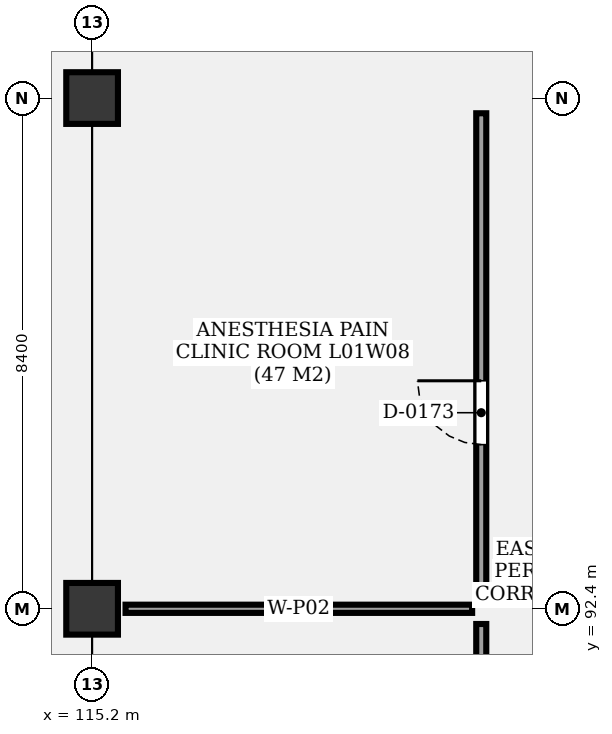
"""IFC4 building model, lengths in metres.
Left out: names, types, materials, properties, quantities, classifications, styles, units other than length and angle.
Written with IfcOpenShell. Run it as: python <this file> out.ifc"""

import sys

from ifc_helpers import new_model, si_unit, direction, frame, frame_2d, origin, origin_2d, place, context, subcontext, project, spatial, rectangle, extrude, element, fill, save


model = new_model("IFC4")
c1 = context("Model", 3, precision=1e-05, world=origin(), true_north=direction((0.0, 1.0)))
c2 = subcontext(c1, "Body", "Model", "MODEL_VIEW")
j1 = project(units=[si_unit("LENGTHUNIT", "METRE"), si_unit("PLANEANGLEUNIT", "RADIAN")], contexts=[c1])
p1 = place(None, origin())
s1 = spatial("IfcSite", under=j1, at=p1, CompositionType="ELEMENT")
p2 = place(p1, origin())
s2 = spatial("IfcBuilding", under=s1, at=p2, CompositionType="ELEMENT")
p3 = place(p2, frame((0.0, 0.0, 5.1)))
s3 = spatial("IfcBuildingStorey", under=s2, at=p3, CompositionType="ELEMENT", Elevation=5.1)
for number, where, z_axis, x_axis in (
    (1, (115.2, 92.4, 0.0), (0.0, 0.0, 1.0), (1.0, 0.0, 0.0)),
    (2, (115.2, 100.8, 0.0), (0.0, 0.0, 1.0), (1.0, 0.0, 0.0)),
):
    element("IfcColumn", number, at=place(p3, frame(where, z_axis=z_axis, x_axis=x_axis)), inside=s3, PredefinedType="COLUMN", context=c2, shape_type="SweptSolid", body=[
        extrude(rectangle(XDim=0.85, YDim=0.85, at=origin_2d()), origin(), (0.0, 0.0, 1.0), 4.8),
    ])
p4 = place(p3, frame((121.6, 84.25, 0.0), z_axis=(0.0, 0.0, 1.0), x_axis=(0.0, 1.0, 0.0)))
e3 = element("IfcWall", 3, at=p4, inside=s3, PredefinedType="PARTITIONING", context=c2, shape_type="SweptSolid", body=[
    extrude(rectangle(XDim=7.9, YDim=0.165, at=frame_2d((3.95, 0.0))), origin(), (0.0, 0.0, 1.0), 3.68),
])
p5 = place(p4, frame((2.45, 0.0, 0.0)))
e4 = element("IfcOpeningElement", 4, at=p5, cuts=e3, PredefinedType="OPENING", context=c2, shape_type="SweptSolid", body=[
    extrude(rectangle(XDim=1.15, YDim=2.2, at=frame_2d((0.575, 1.1))), frame((0.0, 0.093, 0.0), z_axis=(0.0, -1.0, 0.0), x_axis=(1.0, 0.0, 0.0)), (0.0, 0.0, 1.0), 0.185),
])
p6 = place(p3, frame((121.6, 92.65, 0.0), z_axis=(0.0, 0.0, 1.0), x_axis=(0.0, 1.0, 0.0)))
e5 = element("IfcWall", 5, at=p6, inside=s3, PredefinedType="PARTITIONING", context=c2, shape_type="SweptSolid", body=[
    extrude(rectangle(XDim=7.9, YDim=0.165, at=frame_2d((3.95, 0.0))), origin(), (0.0, 0.0, 1.0), 3.68),
])
p7 = place(p6, frame((2.45, 0.0, 0.0)))
e6 = element("IfcOpeningElement", 6, at=p7, cuts=e5, PredefinedType="OPENING", context=c2, shape_type="SweptSolid", body=[
    extrude(rectangle(XDim=1.05, YDim=2.1, at=frame_2d((0.525, 1.05))), frame((0.0, 0.093, 0.0), z_axis=(0.0, -1.0, 0.0), x_axis=(1.0, 0.0, 0.0)), (0.0, 0.0, 1.0), 0.185),
])
p8 = place(p3, frame((115.75, 92.4, 0.0), z_axis=(0.0, 0.0, 1.0), x_axis=(1.0, 0.0, 0.0)))
e7 = element("IfcWall", 7, at=p8, inside=s3, PredefinedType="PARTITIONING", context=c2, shape_type="SweptSolid", body=[
    extrude(rectangle(XDim=5.7, YDim=0.135, at=frame_2d((2.85, 0.0))), origin(), (0.0, 0.0, 1.0), 3.68),
])
p9 = place(p7, origin())
e8 = element("IfcDoor", 8, at=p9, inside=s3, OperationType="SINGLE_SWING_RIGHT", PredefinedType="DOOR", context=c2, shape_type="SweptSolid", body=[
    extrude(rectangle(XDim=1.05, YDim=2.1, at=frame_2d((0.525, 1.05))), frame((0.0, 0.025, 0.0), z_axis=(0.0, -1.0, 0.0), x_axis=(1.0, 0.0, 0.0)), (0.0, 0.0, 1.0), 0.05),
])
fill(e6, e8)
save(model, sys.argv[1])
